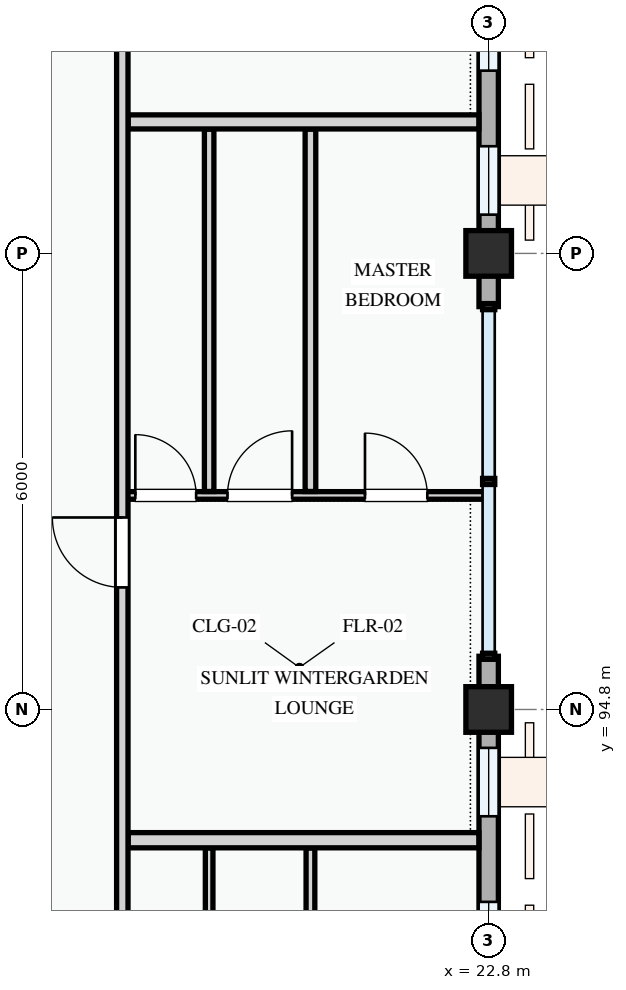
"""IFC4 building model, lengths in metres.
Left out: names, types, materials, properties, quantities, classifications, styles, units other than length and angle.
Written with IfcOpenShell. Run it as: python <this file> out.ifc"""

import sys

from ifc_helpers import new_model, si_unit, direction, frame, frame_2d, origin, origin_2d, place, context, subcontext, project, spatial, rectangle, extrude, element, fill, save


model = new_model("IFC4")
c1 = context("Model", 3, precision=1e-05, world=origin(), true_north=direction((0.0, 1.0)))
c2 = subcontext(c1, "Body", "Model", "MODEL_VIEW")
j1 = project(units=[si_unit("LENGTHUNIT", "METRE"), si_unit("PLANEANGLEUNIT", "RADIAN")], contexts=[c1])
p1 = place(None, origin())
s1 = spatial("IfcSite", under=j1, at=p1, CompositionType="ELEMENT")
p2 = place(p1, origin())
s2 = spatial("IfcBuilding", under=s1, at=p2, CompositionType="ELEMENT")
p3 = place(p2, frame((0.0, 0.0, 37.8)))
s3 = spatial("IfcBuildingStorey", under=s2, at=p3, CompositionType="ELEMENT", Elevation=37.8)
for number, where, z_axis, x_axis in (
    (1, (22.8, 94.8, 0.0), (0.0, 0.0, 1.0), (1.0, 0.0, 0.0)),
    (2, (22.8, 100.8, 0.0), (0.0, 0.0, 1.0), (1.0, 0.0, 0.0)),
):
    element("IfcColumn", number, at=place(p3, frame(where, z_axis=z_axis, x_axis=x_axis)), inside=s3, PredefinedType="COLUMN", context=c2, shape_type="SweptSolid", body=[
        extrude(rectangle(XDim=0.6, YDim=0.6, at=origin_2d()), origin(), (0.0, 0.0, 1.0), 3.3),
    ])
p4 = place(p3, frame((22.8, 86.4, 0.0), z_axis=(0.0, 0.0, 1.0), x_axis=(0.0, 1.0, 0.0)))
e3 = element("IfcWall", 3, at=p4, inside=s3, PredefinedType="STANDARD", context=c2, shape_type="SweptSolid", body=[
    extrude(rectangle(XDim=8.4, YDim=0.255, at=frame_2d((4.2, 0.0))), origin(), (0.0, 0.0, 1.0), 2.425),
])
p5 = place(p4, frame((0.624, 0.0, 0.78)))
e4 = element("IfcOpeningElement", 4, at=p5, cuts=e3, PredefinedType="OPENING", context=c2, shape_type="SweptSolid", body=[
    extrude(rectangle(XDim=2.18, YDim=1.48, at=frame_2d((1.09, 0.74))), frame((0.0, 0.137, 0.0), z_axis=(0.0, -1.0, 0.0), x_axis=(1.0, 0.0, 0.0)), (0.0, 0.0, 1.0), 0.275),
])
p6 = place(p4, frame((4.049, 0.0, 0.78)))
e5 = element("IfcOpeningElement", 5, at=p6, cuts=e3, PredefinedType="OPENING", context=c2, shape_type="SweptSolid", body=[
    extrude(rectangle(XDim=1.82, YDim=1.46, at=frame_2d((0.91, 0.73))), frame((0.0, 0.137, 0.0), z_axis=(0.0, -1.0, 0.0), x_axis=(1.0, 0.0, 0.0)), (0.0, 0.0, 1.0), 0.275),
])
p7 = place(p4, frame((6.995, 0.0, 0.78)))
e6 = element("IfcOpeningElement", 6, at=p7, cuts=e3, PredefinedType="OPENING", context=c2, shape_type="SweptSolid", body=[
    extrude(rectangle(XDim=0.9, YDim=1.2, at=frame_2d((0.45, 0.6))), frame((0.0, 0.137, 0.0), z_axis=(0.0, -1.0, 0.0), x_axis=(1.0, 0.0, 0.0)), (0.0, 0.0, 1.0), 0.275),
])
for number, where, z_axis, x_axis in (
    (7, (22.8, 94.8, 0.0), (0.0, 0.0, 1.0), (0.0, 1.0, 0.0)),
    (8, (22.8, 100.1, 0.0), (0.0, 0.0, 1.0), (0.0, 1.0, 0.0)),
):
    element("IfcWall", number, at=place(p3, frame(where, z_axis=z_axis, x_axis=x_axis)), inside=s3, PredefinedType="STANDARD", context=c2, shape_type="SweptSolid", body=[
        extrude(rectangle(XDim=0.7, YDim=0.255, at=frame_2d((0.35, 0.0))), origin(), (0.0, 0.0, 1.0), 2.575),
    ])
p8 = place(p3, frame((22.8, 100.8, 0.0), z_axis=(0.0, 0.0, 1.0), x_axis=(0.0, 1.0, 0.0)))
e9 = element("IfcWall", 9, at=p8, inside=s3, PredefinedType="STANDARD", context=c2, shape_type="SweptSolid", body=[
    extrude(rectangle(XDim=8.4, YDim=0.255, at=frame_2d((4.2, 0.0))), origin(), (0.0, 0.0, 1.0), 2.425),
])
p9 = place(p8, frame((0.51, 0.0, 0.78)))
e10 = element("IfcOpeningElement", 10, at=p9, cuts=e9, PredefinedType="OPENING", context=c2, shape_type="SweptSolid", body=[
    extrude(rectangle(XDim=0.9, YDim=1.2, at=frame_2d((0.45, 0.6))), frame((0.0, 0.137, 0.0), z_axis=(0.0, -1.0, 0.0), x_axis=(1.0, 0.0, 0.0)), (0.0, 0.0, 1.0), 0.275),
])
p10 = place(p8, frame((2.404, 0.0, 0.78)))
e11 = element("IfcOpeningElement", 11, at=p10, cuts=e9, PredefinedType="OPENING", context=c2, shape_type="SweptSolid", body=[
    extrude(rectangle(XDim=1.92, YDim=1.44, at=frame_2d((0.96, 0.72))), frame((0.0, 0.137, 0.0), z_axis=(0.0, -1.0, 0.0), x_axis=(1.0, 0.0, 0.0)), (0.0, 0.0, 1.0), 0.275),
])
p11 = place(p8, frame((5.514, 0.0, 0.78)))
e12 = element("IfcOpeningElement", 12, at=p11, cuts=e9, PredefinedType="OPENING", context=c2, shape_type="SweptSolid", body=[
    extrude(rectangle(XDim=2.18, YDim=1.48, at=frame_2d((1.09, 0.74))), frame((0.0, 0.137, 0.0), z_axis=(0.0, -1.0, 0.0), x_axis=(1.0, 0.0, 0.0)), (0.0, 0.0, 1.0), 0.275),
])
p12 = place(p3, frame((20.455, 89.702, 0.0), z_axis=(0.0, 0.0, 1.0), x_axis=(0.0, 1.0, 0.0)))
e13 = element("IfcWall", 13, at=p12, inside=s3, PredefinedType="PARTITIONING", context=c2, shape_type="SweptSolid", body=[
    extrude(rectangle(XDim=3.276, YDim=0.115, at=frame_2d((1.638, 0.0))), origin(), (0.0, 0.0, 1.0), 3.0),
])
p13 = place(p3, frame((19.122, 89.702, 0.0), z_axis=(0.0, 0.0, 1.0), x_axis=(0.0, 1.0, 0.0)))
e14 = element("IfcWall", 14, at=p13, inside=s3, PredefinedType="PARTITIONING", context=c2, shape_type="SweptSolid", body=[
    extrude(rectangle(XDim=3.276, YDim=0.1, at=frame_2d((1.638, 0.0))), origin(), (0.0, 0.0, 1.0), 3.0),
])
p14 = place(p3, frame((17.98, 97.616, 0.0), z_axis=(0.0, 0.0, 1.0), x_axis=(1.0, 0.0, 0.0)))
e15 = element("IfcWall", 15, at=p14, inside=s3, PredefinedType="PARTITIONING", context=c2, shape_type="SweptSolid", body=[
    extrude(rectangle(XDim=4.76, YDim=0.1, at=frame_2d((2.38, 0.0))), origin(), (0.0, 0.0, 1.0), 3.0),
])
p15 = place(p14, frame((0.171, 0.0, 0.0)))
e16 = element("IfcOpeningElement", 16, at=p15, cuts=e15, PredefinedType="OPENING", context=c2, shape_type="SweptSolid", body=[
    extrude(rectangle(XDim=0.8, YDim=2.1, at=frame_2d((0.4, 1.05))), frame((0.0, 0.06, 0.0), z_axis=(0.0, -1.0, 0.0), x_axis=(1.0, 0.0, 0.0)), (0.0, 0.0, 1.0), 0.12),
])
p16 = place(p14, frame((1.384, 0.0, 0.0)))
e17 = element("IfcOpeningElement", 17, at=p16, cuts=e15, PredefinedType="OPENING", context=c2, shape_type="SweptSolid", body=[
    extrude(rectangle(XDim=0.85, YDim=2.1, at=frame_2d((0.425, 1.05))), frame((0.0, 0.06, 0.0), z_axis=(0.0, -1.0, 0.0), x_axis=(1.0, 0.0, 0.0)), (0.0, 0.0, 1.0), 0.12),
])
p17 = place(p14, frame((3.193, 0.0, 0.0)))
e18 = element("IfcOpeningElement", 18, at=p17, cuts=e15, PredefinedType="OPENING", context=c2, shape_type="SweptSolid", body=[
    extrude(rectangle(XDim=0.82, YDim=2.08, at=frame_2d((0.41, 1.04))), frame((0.0, 0.06, 0.0), z_axis=(0.0, -1.0, 0.0), x_axis=(1.0, 0.0, 0.0)), (0.0, 0.0, 1.0), 0.12),
])
p18 = place(p3, frame((20.455, 97.668, 0.0), z_axis=(0.0, 0.0, 1.0), x_axis=(0.0, 1.0, 0.0)))
e19 = element("IfcWall", 19, at=p18, inside=s3, PredefinedType="PARTITIONING", context=c2, shape_type="SweptSolid", body=[
    extrude(rectangle(XDim=4.768, YDim=0.14, at=frame_2d((2.384, 0.0))), origin(), (0.0, 0.0, 1.0), 3.0),
])
p19 = place(p3, frame((19.122, 97.668, 0.0), z_axis=(0.0, 0.0, 1.0), x_axis=(0.0, 1.0, 0.0)))
e20 = element("IfcWall", 20, at=p19, inside=s3, PredefinedType="PARTITIONING", context=c2, shape_type="SweptSolid", body=[
    extrude(rectangle(XDim=4.768, YDim=0.125, at=frame_2d((2.384, 0.0))), origin(), (0.0, 0.0, 1.0), 3.0),
])
p20 = place(p3, frame((18.057, 93.08, 0.0), z_axis=(0.0, 0.0, 1.0), x_axis=(1.0, 0.0, 0.0)))
e21 = element("IfcWall", 21, at=p20, inside=s3, PredefinedType="PARTITIONING", context=c2, shape_type="SweptSolid", body=[
    extrude(rectangle(XDim=4.614, YDim=0.2, at=frame_2d((2.307, 0.0))), origin(), (0.0, 0.0, 1.0), 3.0),
])
p21 = place(p3, frame((18.057, 102.53, 0.0), z_axis=(0.0, 0.0, 1.0), x_axis=(1.0, 0.0, 0.0)))
e22 = element("IfcWall", 22, at=p21, inside=s3, PredefinedType="PARTITIONING", context=c2, shape_type="SweptSolid", body=[
    extrude(rectangle(XDim=4.614, YDim=0.185, at=frame_2d((2.307, 0.0))), origin(), (0.0, 0.0, 1.0), 3.0),
])
p22 = place(p3, frame((17.98, 86.46, 0.0), z_axis=(0.0, 0.0, 1.0), x_axis=(0.0, 1.0, 0.0)))
e23 = element("IfcWall", 23, at=p22, inside=s3, PredefinedType="PARTITIONING", context=c2, shape_type="SweptSolid", body=[
    extrude(rectangle(XDim=22.88, YDim=0.15, at=frame_2d((11.44, 0.0))), origin(), (0.0, 0.0, 1.0), 3.0),
])
p23 = place(p22, frame((1.968, 0.0, 0.0)))
e24 = element("IfcOpeningElement", 24, at=p23, cuts=e23, PredefinedType="OPENING", context=c2, shape_type="SweptSolid", body=[
    extrude(rectangle(XDim=0.96, YDim=2.12, at=frame_2d((0.48, 1.06))), frame((0.0, 0.085, 0.0), z_axis=(0.0, -1.0, 0.0), x_axis=(1.0, 0.0, 0.0)), (0.0, 0.0, 1.0), 0.17),
])
p24 = place(p22, frame((9.946, 0.0, 0.0)))
e25 = element("IfcOpeningElement", 25, at=p24, cuts=e23, PredefinedType="OPENING", context=c2, shape_type="SweptSolid", body=[
    extrude(rectangle(XDim=0.92, YDim=2.1, at=frame_2d((0.46, 1.05))), frame((0.0, 0.085, 0.0), z_axis=(0.0, -1.0, 0.0), x_axis=(1.0, 0.0, 0.0)), (0.0, 0.0, 1.0), 0.17),
])
p25 = place(p22, frame((18.072, 0.0, 0.0)))
e26 = element("IfcOpeningElement", 26, at=p25, cuts=e23, PredefinedType="OPENING", context=c2, shape_type="SweptSolid", body=[
    extrude(rectangle(XDim=0.92, YDim=2.1, at=frame_2d((0.46, 1.05))), frame((0.0, 0.085, 0.0), z_axis=(0.0, -1.0, 0.0), x_axis=(1.0, 0.0, 0.0)), (0.0, 0.0, 1.0), 0.17),
])
p26 = place(p6, origin())
e27 = element("IfcWindow", 27, at=p26, inside=s3, PartitioningType="DOUBLE_PANEL_VERTICAL", PredefinedType="WINDOW", context=c2, shape_type="SweptSolid", body=[
    extrude(rectangle(XDim=1.82, YDim=1.46, at=frame_2d((0.91, 0.73))), frame((0.0, 0.03, 0.0), z_axis=(0.0, -1.0, 0.0), x_axis=(1.0, 0.0, 0.0)), (0.0, 0.0, 1.0), 0.06),
])
fill(e5, e27)
p27 = place(p7, origin())
e28 = element("IfcWindow", 28, at=p27, inside=s3, PartitioningType="SINGLE_PANEL", PredefinedType="WINDOW", context=c2, shape_type="SweptSolid", body=[
    extrude(rectangle(XDim=0.9, YDim=1.2, at=frame_2d((0.45, 0.6))), frame((0.0, 0.03, 0.0), z_axis=(0.0, -1.0, 0.0), x_axis=(1.0, 0.0, 0.0)), (0.0, 0.0, 1.0), 0.06),
])
fill(e6, e28)
p28 = place(p9, origin())
e29 = element("IfcWindow", 29, at=p28, inside=s3, PartitioningType="SINGLE_PANEL", PredefinedType="WINDOW", context=c2, shape_type="SweptSolid", body=[
    extrude(rectangle(XDim=0.9, YDim=1.2, at=frame_2d((0.45, 0.6))), frame((0.0, 0.03, 0.0), z_axis=(0.0, -1.0, 0.0), x_axis=(1.0, 0.0, 0.0)), (0.0, 0.0, 1.0), 0.06),
])
fill(e10, e29)
p29 = place(p10, origin())
e30 = element("IfcWindow", 30, at=p29, inside=s3, PartitioningType="DOUBLE_PANEL_VERTICAL", PredefinedType="WINDOW", context=c2, shape_type="SweptSolid", body=[
    extrude(rectangle(XDim=1.92, YDim=1.44, at=frame_2d((0.96, 0.72))), frame((0.0, 0.03, 0.0), z_axis=(0.0, -1.0, 0.0), x_axis=(1.0, 0.0, 0.0)), (0.0, 0.0, 1.0), 0.06),
])
fill(e11, e30)
p30 = place(p15, origin())
e31 = element("IfcDoor", 31, at=p30, inside=s3, OperationType="SINGLE_SWING_LEFT", PredefinedType="DOOR", context=c2, shape_type="SweptSolid", body=[
    extrude(rectangle(XDim=0.8, YDim=2.1, at=frame_2d((0.4, 1.05))), frame((0.0, 0.025, 0.0), z_axis=(0.0, -1.0, 0.0), x_axis=(1.0, 0.0, 0.0)), (0.0, 0.0, 1.0), 0.05),
])
fill(e16, e31)
p31 = place(p16, origin())
e32 = element("IfcDoor", 32, at=p31, inside=s3, OperationType="SINGLE_SWING_RIGHT", PredefinedType="DOOR", context=c2, shape_type="SweptSolid", body=[
    extrude(rectangle(XDim=0.85, YDim=2.1, at=frame_2d((0.425, 1.05))), frame((0.0, 0.025, 0.0), z_axis=(0.0, -1.0, 0.0), x_axis=(1.0, 0.0, 0.0)), (0.0, 0.0, 1.0), 0.05),
])
fill(e17, e32)
p32 = place(p17, origin())
e33 = element("IfcDoor", 33, at=p32, inside=s3, OperationType="SINGLE_SWING_LEFT", PredefinedType="DOOR", context=c2, shape_type="SweptSolid", body=[
    extrude(rectangle(XDim=0.82, YDim=2.08, at=frame_2d((0.41, 1.04))), frame((0.0, 0.025, 0.0), z_axis=(0.0, -1.0, 0.0), x_axis=(1.0, 0.0, 0.0)), (0.0, 0.0, 1.0), 0.05),
])
fill(e18, e33)
p33 = place(p24, origin())
e34 = element("IfcDoor", 34, at=p33, inside=s3, OperationType="SINGLE_SWING_RIGHT", PredefinedType="DOOR", context=c2, shape_type="SweptSolid", body=[
    extrude(rectangle(XDim=0.92, YDim=2.1, at=frame_2d((0.46, 1.05))), frame((0.0, 0.025, 0.0), z_axis=(0.0, -1.0, 0.0), x_axis=(1.0, 0.0, 0.0)), (0.0, 0.0, 1.0), 0.05),
])
fill(e25, e34)
save(model, sys.argv[1])
